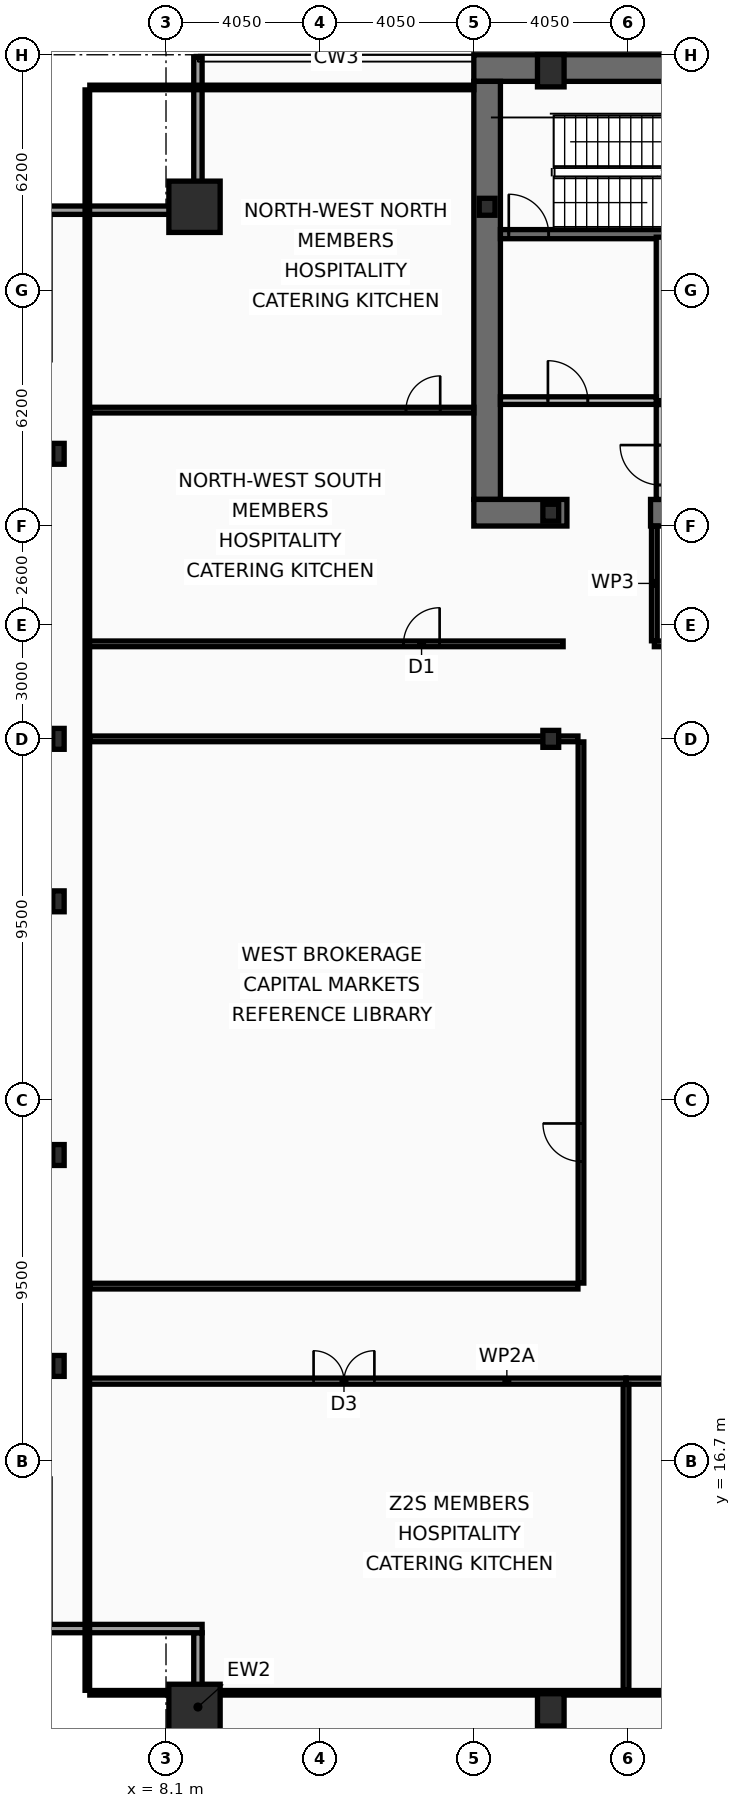
"""IFC4 building model, lengths in metres.
Left out: names, types, materials, properties, quantities, classifications, styles, units other than length and angle.
Written with IfcOpenShell. Run it as: python <this file> out.ifc"""

import sys

from ifc_helpers import new_model, si_unit, direction, frame, frame_2d, origin, origin_2d, place, context, subcontext, project, spatial, rectangle, hollow_rectangle, i_section, extrude, element, fill, save


model = new_model("IFC4")
c1 = context("Model", 3, precision=1e-05, world=origin(), true_north=direction((0.0, 1.0)))
c2 = subcontext(c1, "Body", "Model", "MODEL_VIEW")
j1 = project(units=[si_unit("LENGTHUNIT", "METRE"), si_unit("PLANEANGLEUNIT", "RADIAN")], contexts=[c1])
p1 = place(None, origin())
s1 = spatial("IfcSite", under=j1, at=p1, CompositionType="ELEMENT")
p2 = place(p1, origin())
s2 = spatial("IfcBuilding", under=s1, at=p2, CompositionType="ELEMENT")
p3 = place(p2, frame((0.0, 0.0, 150.6)))
s3 = spatial("IfcBuildingStorey", under=s2, at=p3, CompositionType="ELEMENT", Elevation=150.6)
p4 = place(p3, frame((16.2, 53.35, 0.0), z_axis=(0.0, 0.0, 1.0), x_axis=(1.0, 0.0, 0.0)))
e1 = element("IfcWall", 1, at=p4, inside=s3, PredefinedType="SHEAR", context=c2, shape_type="SweptSolid", body=[
    extrude(rectangle(XDim=40.5, YDim=0.7, at=frame_2d((20.25, 0.0))), origin(), (0.0, 0.0, 1.0), 3.44),
])
p5 = place(p3, frame((16.55, 42.0, 0.0), z_axis=(0.0, 0.0, 1.0), x_axis=(0.0, 1.0, 0.0)))
e2 = element("IfcWall", 2, at=p5, inside=s3, PredefinedType="SHEAR", context=c2, shape_type="SweptSolid", body=[
    extrude(rectangle(XDim=11.0, YDim=0.7, at=frame_2d((5.5, 0.0))), origin(), (0.0, 0.0, 1.0), 3.44),
])
p6 = place(p3, frame((18.65, 41.65, 0.0), z_axis=(0.0, 0.0, 1.0), x_axis=(-1.0, 0.0, 0.0)))
e3 = element("IfcWall", 3, at=p6, inside=s3, PredefinedType="SHEAR", context=c2, shape_type="SweptSolid", body=[
    extrude(rectangle(XDim=2.45, YDim=0.7, at=frame_2d((1.225, 0.0))), origin(), (0.0, 0.0, 1.0), 3.44),
])
p7 = place(p3, frame((32.3, 41.65, 0.0), z_axis=(0.0, 0.0, 1.0), x_axis=(-1.0, 0.0, 0.0)))
e4 = element("IfcWall", 4, at=p7, inside=s3, PredefinedType="SHEAR", context=c2, shape_type="SweptSolid", body=[
    extrude(rectangle(XDim=11.45, YDim=0.7, at=frame_2d((5.725, 0.0))), origin(), (0.0, 0.0, 1.0), 3.44),
])
p8 = place(p3, frame((16.9, 48.98, 0.0), z_axis=(0.0, 0.0, 1.0), x_axis=(1.0, 0.0, 0.0)))
e5 = element("IfcWall", 5, at=p8, inside=s3, PredefinedType="SHEAR", context=c2, shape_type="SweptSolid", body=[
    extrude(rectangle(XDim=7.32, YDim=0.24, at=frame_2d((3.66, 0.0))), origin(), (0.0, 0.0, 1.0), 3.44),
])
p9 = place(p8, frame((0.22, 0.0, 0.0)))
e6 = element("IfcOpeningElement", 6, at=p9, cuts=e5, PredefinedType="OPENING", context=c2, shape_type="SweptSolid", body=[
    extrude(rectangle(XDim=1.05, YDim=2.15, at=frame_2d((0.525, 1.075))), frame((0.0, 0.13, 0.0), z_axis=(0.0, -1.0, 0.0), x_axis=(1.0, 0.0, 0.0)), (0.0, 0.0, 1.0), 0.26),
])
for number, where, z_axis, x_axis in (
    (7, (8.85, 10.15, 0.0), (0.0, 0.0, 1.0), (1.0, 0.0, 0.0)),
    (8, (8.85, 49.7, 0.0), (0.0, 0.0, 1.0), (1.0, 0.0, 0.0)),
):
    element("IfcColumn", number, at=place(p3, frame(where, z_axis=z_axis, x_axis=x_axis)), inside=s3, PredefinedType="COLUMN", context=c2, shape_type="SweptSolid", body=[
        extrude(hollow_rectangle(XDim=1.35, YDim=1.35, WallThickness=0.065, at=origin_2d()), origin(), (0.0, 0.0, 1.0), 3.6),
    ])
for number, where, z_axis, x_axis in (
    (9, (18.225, 10.15, 0.0), (0.0, 0.0, 1.0), (1.0, 0.0, 0.0)),
    (10, (18.225, 53.28, 0.0), (0.0, 0.0, 1.0), (1.0, 0.0, 0.0)),
):
    element("IfcColumn", number, at=place(p3, frame(where, z_axis=z_axis, x_axis=x_axis)), inside=s3, PredefinedType="COLUMN", context=c2, shape_type="SweptSolid", body=[
        extrude(hollow_rectangle(XDim=0.7, YDim=0.85, WallThickness=0.05, at=origin_2d()), origin(), (0.0, 0.0, 1.0), 3.6),
    ])
for number, where, z_axis, x_axis in (
    (11, (5.27, 19.2, 0.0), (0.0, 0.0, 1.0), (1.0, 0.0, 0.0)),
    (12, (5.27, 24.75, 0.0), (0.0, 0.0, 1.0), (1.0, 0.0, 0.0)),
    (13, (5.27, 31.425, 0.0), (0.0, 0.0, 1.0), (1.0, 0.0, 0.0)),
    (14, (5.27, 35.7, 0.0), (0.0, 0.0, 1.0), (1.0, 0.0, 0.0)),
    (15, (5.27, 43.2, 0.0), (0.0, 0.0, 1.0), (1.0, 0.0, 0.0)),
):
    element("IfcColumn", number, at=place(p3, frame(where, z_axis=z_axis, x_axis=x_axis)), inside=s3, PredefinedType="COLUMN", context=c2, shape_type="SweptSolid", body=[
        extrude(i_section(OverallWidth=0.3, OverallDepth=0.55, WebThickness=0.015, FlangeThickness=0.029, at=origin_2d()), origin(), (0.0, 0.0, 1.0), 3.6),
    ])
for number, where, z_axis, x_axis in (
    (16, (16.55, 49.7, 0.0), (0.0, 0.0, 1.0), (1.0, 0.0, 0.0)),
    (17, (18.225, 35.7, 0.0), (0.0, 0.0, 1.0), (1.0, 0.0, 0.0)),
    (18, (18.225, 41.65, 0.0), (0.0, 0.0, 1.0), (1.0, 0.0, 0.0)),
):
    element("IfcColumn", number, at=place(p3, frame(where, z_axis=z_axis, x_axis=x_axis)), inside=s3, PredefinedType="COLUMN", context=c2, shape_type="SweptSolid", body=[
        extrude(i_section(OverallWidth=0.416, OverallDepth=0.446, WebThickness=0.039, FlangeThickness=0.063, at=origin_2d()), origin(), (0.0, 0.0, 1.0), 3.6),
    ])
p10 = place(p3, frame((8.94, 8.27, 0.0), z_axis=(0.0, 0.0, 1.0), x_axis=(0.0, 1.0, 0.0)))
e19 = element("IfcWall", 19, at=p10, inside=s3, PredefinedType="SOLIDWALL", context=c2, shape_type="SweptSolid", body=[
    extrude(rectangle(XDim=3.91, YDim=0.22, at=frame_2d((1.955, 0.0))), origin(), (0.0, 0.0, 1.0), 2.83),
])
for number, where, z_axis, x_axis in (
    (20, (9.05, 12.29, 0.0), (0.0, 0.0, 1.0), (-1.0, 0.0, 0.0)),
    (21, (4.83, 49.61, 0.0), (0.0, 0.0, 1.0), (1.0, 0.0, 0.0)),
):
    element("IfcWall", number, at=place(p3, frame(where, z_axis=z_axis, x_axis=x_axis)), inside=s3, PredefinedType="SOLIDWALL", context=c2, shape_type="SweptSolid", body=[
        extrude(rectangle(XDim=4.22, YDim=0.22, at=frame_2d((2.11, 0.0))), origin(), (0.0, 0.0, 1.0), 2.83),
    ])
p11 = place(p3, frame((8.94, 49.72, 0.0), z_axis=(0.0, 0.0, 1.0), x_axis=(0.0, 1.0, 0.0)))
e22 = element("IfcWall", 22, at=p11, inside=s3, PredefinedType="SOLIDWALL", context=c2, shape_type="SweptSolid", body=[
    extrude(rectangle(XDim=3.91, YDim=0.22, at=frame_2d((1.955, 0.0))), origin(), (0.0, 0.0, 1.0), 2.83),
])
p12 = place(p3, frame((21.1, 44.6, 0.0), z_axis=(0.0, 0.0, 1.0), x_axis=(0.0, 1.0, 0.0)))
e23 = element("IfcWall", 23, at=p12, inside=s3, PredefinedType="PARTITIONING", context=c2, shape_type="SweptSolid", body=[
    extrude(rectangle(XDim=4.3, YDim=0.2, at=frame_2d((2.15, 0.0))), origin(), (0.0, 0.0, 1.0), 3.44),
])
p13 = place(p3, frame((16.9, 44.6, 0.0), z_axis=(0.0, 0.0, 1.0), x_axis=(1.0, 0.0, 0.0)))
e24 = element("IfcWall", 24, at=p13, inside=s3, PredefinedType="PARTITIONING", context=c2, shape_type="SweptSolid", body=[
    extrude(rectangle(XDim=4.1, YDim=0.2, at=frame_2d((2.05, 0.0))), origin(), (0.0, 0.0, 1.0), 3.44),
])
p14 = place(p13, frame((1.25, 0.0, 0.0)))
e25 = element("IfcOpeningElement", 25, at=p14, cuts=e24, PredefinedType="OPENING", context=c2, shape_type="SweptSolid", body=[
    extrude(rectangle(XDim=1.05, YDim=2.15, at=frame_2d((0.525, 1.075))), frame((0.0, 0.11, 0.0), z_axis=(0.0, -1.0, 0.0), x_axis=(1.0, 0.0, 0.0)), (0.0, 0.0, 1.0), 0.22),
])
p15 = place(p3, frame((21.1, 42.0, 0.0), z_axis=(0.0, 0.0, 1.0), x_axis=(0.0, 1.0, 0.0)))
e26 = element("IfcWall", 26, at=p15, inside=s3, PredefinedType="PARTITIONING", context=c2, shape_type="SweptSolid", body=[
    extrude(rectangle(XDim=2.495, YDim=0.2, at=frame_2d((1.248, 0.0))), origin(), (0.0, 0.0, 1.0), 3.44),
])
p16 = place(p15, frame((0.38, 0.0, 0.0)))
e27 = element("IfcOpeningElement", 27, at=p16, cuts=e26, PredefinedType="OPENING", context=c2, shape_type="SweptSolid", body=[
    extrude(rectangle(XDim=1.05, YDim=2.15, at=frame_2d((0.525, 1.075))), frame((0.0, 0.11, 0.0), z_axis=(0.0, -1.0, 0.0), x_axis=(1.0, 0.0, 0.0)), (0.0, 0.0, 1.0), 0.22),
])
p17 = place(p3, frame((20.95, 38.2, 0.0), z_axis=(0.0, 0.0, 1.0), x_axis=(1.0, 0.0, 0.0)))
e28 = element("IfcWall", 28, at=p17, inside=s3, PredefinedType="PARTITIONING", context=c2, shape_type="SweptSolid", body=[
    extrude(rectangle(XDim=4.55, YDim=0.15, at=frame_2d((2.275, 0.0))), origin(), (0.0, 0.0, 1.0), 2.73),
])
p18 = place(p17, frame((0.9, 0.0, 0.0)))
e29 = element("IfcOpeningElement", 29, at=p18, cuts=e28, PredefinedType="OPENING", context=c2, shape_type="SweptSolid", body=[
    extrude(rectangle(XDim=0.95, YDim=2.05, at=frame_2d((0.475, 1.025))), frame((0.0, 0.085, 0.0), z_axis=(0.0, -1.0, 0.0), x_axis=(1.0, 0.0, 0.0)), (0.0, 0.0, 1.0), 0.17),
])
p19 = place(p3, frame((20.95, 38.28, 0.0), z_axis=(0.0, 0.0, 1.0), x_axis=(0.0, 1.0, 0.0)))
e30 = element("IfcWall", 30, at=p19, inside=s3, PredefinedType="PARTITIONING", context=c2, shape_type="SweptSolid", body=[
    extrude(rectangle(XDim=3.02, YDim=0.15, at=frame_2d((1.51, 0.0))), origin(), (0.0, 0.0, 1.0), 3.44),
])
p20 = place(p3, frame((6.03, 38.2, 0.0), z_axis=(0.0, 0.0, 1.0), x_axis=(1.0, 0.0, 0.0)))
e31 = element("IfcWall", 31, at=p20, inside=s3, PredefinedType="PARTITIONING", context=c2, shape_type="SweptSolid", body=[
    extrude(rectangle(XDim=12.52, YDim=0.15, at=frame_2d((6.26, 0.0))), origin(), (0.0, 0.0, 1.0), 2.73),
])
p21 = place(p20, frame((8.32, 0.0, 0.0)))
e32 = element("IfcOpeningElement", 32, at=p21, cuts=e31, PredefinedType="OPENING", context=c2, shape_type="SweptSolid", body=[
    extrude(rectangle(XDim=0.95, YDim=2.05, at=frame_2d((0.475, 1.025))), frame((0.0, 0.085, 0.0), z_axis=(0.0, -1.0, 0.0), x_axis=(1.0, 0.0, 0.0)), (0.0, 0.0, 1.0), 0.17),
])
p22 = place(p3, frame((6.095, 44.35, 0.0), z_axis=(0.0, 0.0, 1.0), x_axis=(1.0, 0.0, 0.0)))
e33 = element("IfcWall", 33, at=p22, inside=s3, PredefinedType="PARTITIONING", context=c2, shape_type="SweptSolid", body=[
    extrude(rectangle(XDim=10.105, YDim=0.15, at=frame_2d((5.052, 0.0))), origin(), (0.0, 0.0, 1.0), 2.83),
])
p23 = place(p22, frame((8.32, 0.0, 0.0)))
e34 = element("IfcOpeningElement", 34, at=p23, cuts=e33, PredefinedType="OPENING", context=c2, shape_type="SweptSolid", body=[
    extrude(rectangle(XDim=0.9, YDim=2.05, at=frame_2d((0.45, 1.025))), frame((0.0, 0.085, 0.0), z_axis=(0.0, -1.0, 0.0), x_axis=(1.0, 0.0, 0.0)), (0.0, 0.0, 1.0), 0.17),
])
p24 = place(p3, frame((6.03, 18.8, 0.0), z_axis=(0.0, 0.0, 1.0), x_axis=(1.0, 0.0, 0.0)))
e35 = element("IfcWall", 35, at=p24, inside=s3, PredefinedType="PARTITIONING", context=c2, shape_type="SweptSolid", body=[
    extrude(rectangle(XDim=14.175, YDim=0.16, at=frame_2d((7.087, 0.0))), origin(), (0.0, 0.0, 1.0), 2.73),
])
p25 = place(p24, frame((5.953, 0.0, 0.0)))
e36 = element("IfcOpeningElement", 36, at=p25, cuts=e35, PredefinedType="OPENING", context=c2, shape_type="SweptSolid", body=[
    extrude(rectangle(XDim=1.6, YDim=2.15, at=frame_2d((0.8, 1.075))), frame((0.0, 0.09, 0.0), z_axis=(0.0, -1.0, 0.0), x_axis=(1.0, 0.0, 0.0)), (0.0, 0.0, 1.0), 0.18),
])
p26 = place(p3, frame((20.205, 18.8, 0.0), z_axis=(0.0, 0.0, 1.0), x_axis=(1.0, 0.0, 0.0)))
e37 = element("IfcWall", 37, at=p26, inside=s3, PredefinedType="PARTITIONING", context=c2, shape_type="SweptSolid", body=[
    extrude(rectangle(XDim=9.831, YDim=0.16, at=frame_2d((4.916, 0.0))), origin(), (0.0, 0.0, 1.0), 2.73),
])
p27 = place(p26, frame((4.129, 0.0, 0.0)))
e38 = element("IfcOpeningElement", 38, at=p27, cuts=e37, PredefinedType="OPENING", context=c2, shape_type="SweptSolid", body=[
    extrude(rectangle(XDim=1.0, YDim=2.05, at=frame_2d((0.5, 1.025))), frame((0.0, 0.09, 0.0), z_axis=(0.0, -1.0, 0.0), x_axis=(1.0, 0.0, 0.0)), (0.0, 0.0, 1.0), 0.18),
])
p28 = place(p3, frame((20.205, 10.665, 0.0), z_axis=(0.0, 0.0, 1.0), x_axis=(0.0, 1.0, 0.0)))
e39 = element("IfcWall", 39, at=p28, inside=s3, PredefinedType="PARTITIONING", context=c2, shape_type="SweptSolid", body=[
    extrude(rectangle(XDim=8.05, YDim=0.15, at=frame_2d((4.025, 0.0))), origin(), (0.0, 0.0, 1.0), 2.93),
])
p29 = place(p3, frame((19.02, 21.38, 0.0), z_axis=(0.0, 0.0, 1.0), x_axis=(0.0, 1.0, 0.0)))
e40 = element("IfcWall", 40, at=p29, inside=s3, PredefinedType="PARTITIONING", context=c2, shape_type="SweptSolid", body=[
    extrude(rectangle(XDim=14.24, YDim=0.15, at=frame_2d((7.12, 0.0))), origin(), (0.0, 0.0, 1.0), 2.93),
])
p30 = place(p29, frame((3.2, 0.0, 0.0)))
e41 = element("IfcOpeningElement", 41, at=p30, cuts=e40, PredefinedType="OPENING", context=c2, shape_type="SweptSolid", body=[
    extrude(rectangle(XDim=1.0, YDim=2.05, at=frame_2d((0.5, 1.025))), frame((0.0, 0.085, 0.0), z_axis=(0.0, -1.0, 0.0), x_axis=(1.0, 0.0, 0.0)), (0.0, 0.0, 1.0), 0.17),
])
for number, where, z_axis, x_axis in (
    (42, (6.095, 21.3, 0.0), (0.0, 0.0, 1.0), (1.0, 0.0, 0.0)),
    (43, (6.095, 35.7, 0.0), (0.0, 0.0, 1.0), (1.0, 0.0, 0.0)),
):
    element("IfcWall", number, at=place(p3, frame(where, z_axis=z_axis, x_axis=x_axis)), inside=s3, PredefinedType="PARTITIONING", context=c2, shape_type="SweptSolid", body=[
        extrude(rectangle(XDim=12.845, YDim=0.15, at=frame_2d((6.422, 0.0))), origin(), (0.0, 0.0, 1.0), 2.73),
    ])
p31 = place(p3, frame((6.03, 10.665, 0.0), z_axis=(0.0, 0.0, 1.0), x_axis=(0.0, 1.0, 0.0)))
e44 = element("IfcWall", 44, at=p31, inside=s3, PredefinedType="PARTITIONING", context=c2, shape_type="SweptSolid", body=[
    extrude(rectangle(XDim=42.11, YDim=0.12, at=frame_2d((21.055, 0.0))), origin(), (0.0, 0.0, 1.0), 2.73),
])
p32 = place(p3, frame((6.095, 52.84, 0.0), z_axis=(0.0, 0.0, 1.0), x_axis=(1.0, 0.0, 0.0)))
e45 = element("IfcWall", 45, at=p32, inside=s3, PredefinedType="PARTITIONING", context=c2, shape_type="SweptSolid", body=[
    extrude(rectangle(XDim=10.105, YDim=0.12, at=frame_2d((5.052, 0.0))), origin(), (0.0, 0.0, 1.0), 3.44),
])
p33 = place(p3, frame((6.095, 10.6, 0.0), z_axis=(0.0, 0.0, 1.0), x_axis=(1.0, 0.0, 0.0)))
e46 = element("IfcWall", 46, at=p33, inside=s3, PredefinedType="PARTITIONING", context=c2, shape_type="SweptSolid", body=[
    extrude(rectangle(XDim=60.71, YDim=0.12, at=frame_2d((30.355, 0.0))), origin(), (0.0, 0.0, 1.0), 2.73),
])
p34 = place(p9, origin())
e47 = element("IfcDoor", 47, at=p34, inside=s3, OperationType="SINGLE_SWING_LEFT", PredefinedType="DOOR", context=c2, shape_type="SweptSolid", body=[
    extrude(rectangle(XDim=1.05, YDim=2.15, at=frame_2d((0.525, 1.075))), frame((0.0, 0.025, 0.0), z_axis=(0.0, -1.0, 0.0), x_axis=(1.0, 0.0, 0.0)), (0.0, 0.0, 1.0), 0.05),
])
fill(e6, e47)
p35 = place(p14, origin())
e48 = element("IfcDoor", 48, at=p35, inside=s3, OperationType="SINGLE_SWING_LEFT", PredefinedType="DOOR", context=c2, shape_type="SweptSolid", body=[
    extrude(rectangle(XDim=1.05, YDim=2.15, at=frame_2d((0.525, 1.075))), frame((0.0, 0.025, 0.0), z_axis=(0.0, -1.0, 0.0), x_axis=(1.0, 0.0, 0.0)), (0.0, 0.0, 1.0), 0.05),
])
fill(e25, e48)
p36 = place(p16, origin())
e49 = element("IfcDoor", 49, at=p36, inside=s3, OperationType="SINGLE_SWING_RIGHT", PredefinedType="DOOR", context=c2, shape_type="SweptSolid", body=[
    extrude(rectangle(XDim=1.05, YDim=2.15, at=frame_2d((0.525, 1.075))), frame((0.0, 0.025, 0.0), z_axis=(0.0, -1.0, 0.0), x_axis=(1.0, 0.0, 0.0)), (0.0, 0.0, 1.0), 0.05),
])
fill(e27, e49)
p37 = place(p21, origin())
e50 = element("IfcDoor", 50, at=p37, inside=s3, OperationType="SINGLE_SWING_RIGHT", PredefinedType="DOOR", context=c2, shape_type="SweptSolid", body=[
    extrude(rectangle(XDim=0.95, YDim=2.05, at=frame_2d((0.475, 1.025))), frame((0.0, 0.025, 0.0), z_axis=(0.0, -1.0, 0.0), x_axis=(1.0, 0.0, 0.0)), (0.0, 0.0, 1.0), 0.05),
])
fill(e32, e50)
p38 = place(p23, origin())
e51 = element("IfcDoor", 51, at=p38, inside=s3, OperationType="SINGLE_SWING_RIGHT", PredefinedType="DOOR", context=c2, shape_type="SweptSolid", body=[
    extrude(rectangle(XDim=0.9, YDim=2.05, at=frame_2d((0.45, 1.025))), frame((0.0, 0.025, 0.0), z_axis=(0.0, -1.0, 0.0), x_axis=(1.0, 0.0, 0.0)), (0.0, 0.0, 1.0), 0.05),
])
fill(e34, e51)
p39 = place(p25, origin())
e52 = element("IfcDoor", 52, at=p39, inside=s3, OperationType="DOUBLE_DOOR_SINGLE_SWING", PredefinedType="DOOR", context=c2, shape_type="SweptSolid", body=[
    extrude(rectangle(XDim=1.6, YDim=2.15, at=frame_2d((0.8, 1.075))), frame((0.0, 0.025, 0.0), z_axis=(0.0, -1.0, 0.0), x_axis=(1.0, 0.0, 0.0)), (0.0, 0.0, 1.0), 0.05),
])
fill(e36, e52)
p40 = place(p30, origin())
e53 = element("IfcDoor", 53, at=p40, inside=s3, OperationType="SINGLE_SWING_RIGHT", PredefinedType="DOOR", context=c2, shape_type="SweptSolid", body=[
    extrude(rectangle(XDim=1.0, YDim=2.05, at=frame_2d((0.5, 1.025))), frame((0.0, 0.025, 0.0), z_axis=(0.0, -1.0, 0.0), x_axis=(1.0, 0.0, 0.0)), (0.0, 0.0, 1.0), 0.05),
])
fill(e41, e53)
save(model, sys.argv[1])
